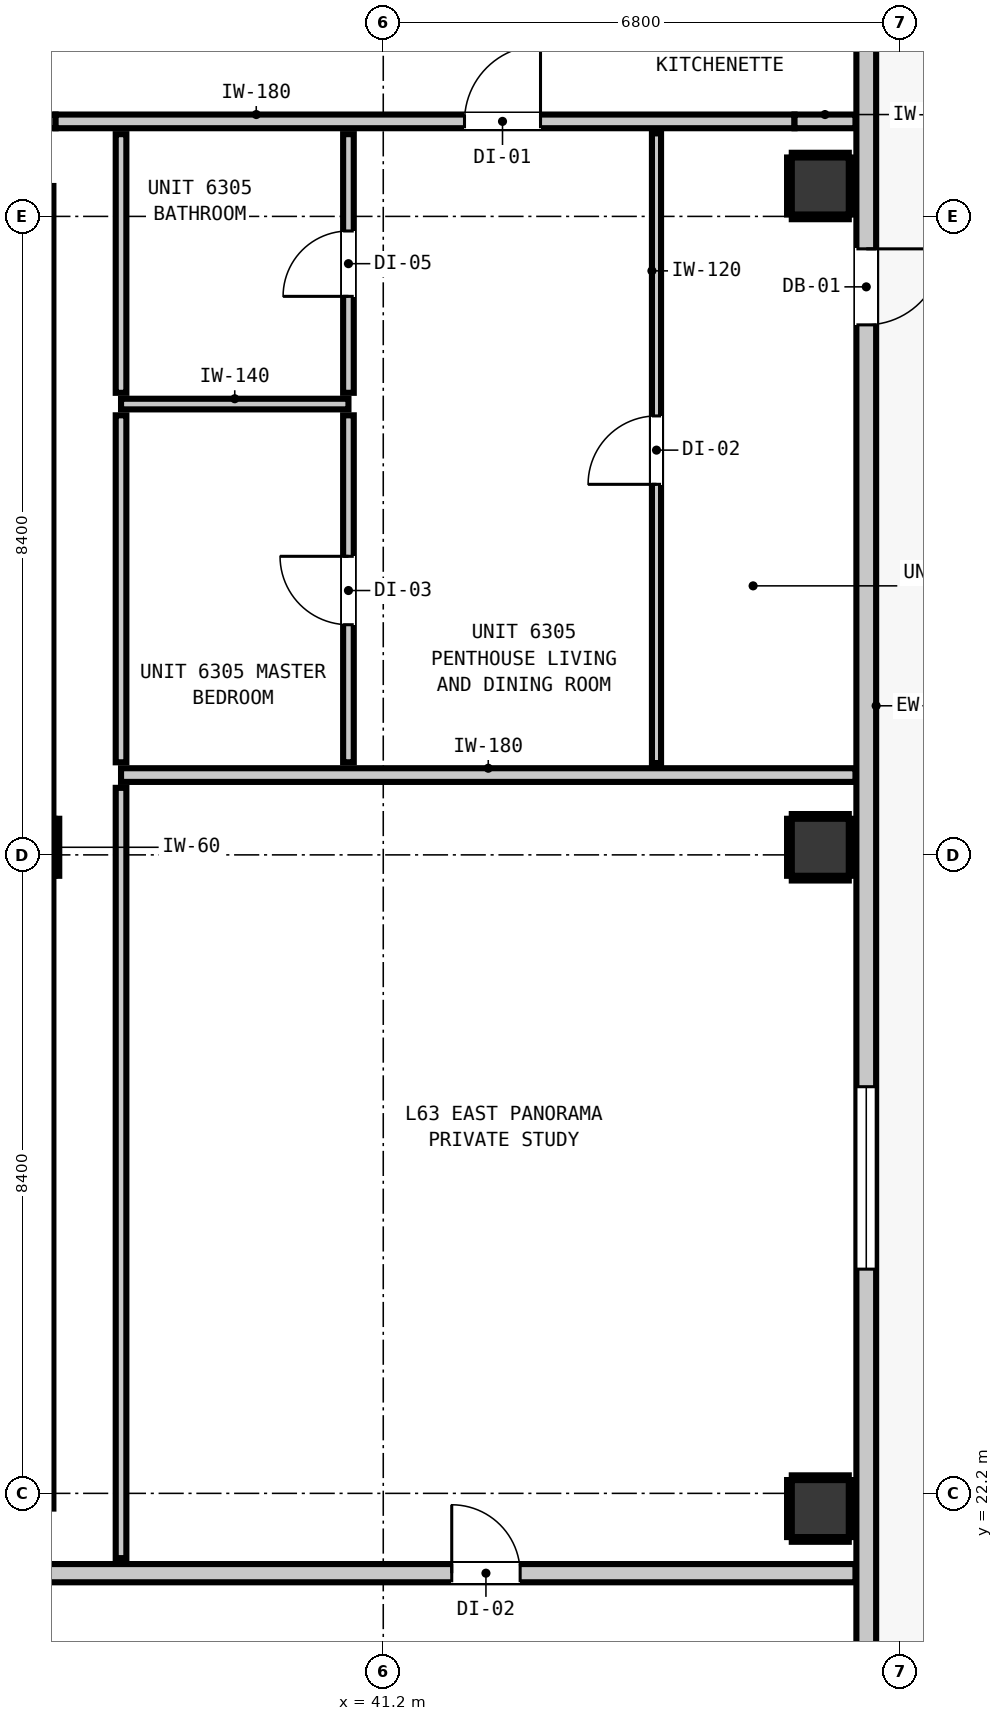
"""IFC4 building model, lengths in metres.
Left out: names, types, materials, properties, quantities, classifications, styles, units other than length and angle.
Written with IfcOpenShell. Run it as: python <this file> out.ifc"""

import sys

from ifc_helpers import new_model, si_unit, direction, frame, frame_2d, origin, origin_2d, place, context, subcontext, project, spatial, rectangle, extrude, element, fill, save


model = new_model("IFC4")
c1 = context("Model", 3, precision=1e-05, world=origin(), true_north=direction((0.0, 1.0)))
c2 = subcontext(c1, "Body", "Model", "MODEL_VIEW")
j1 = project(units=[si_unit("LENGTHUNIT", "METRE"), si_unit("PLANEANGLEUNIT", "RADIAN")], contexts=[c1])
p1 = place(None, origin())
s1 = spatial("IfcSite", under=j1, at=p1, CompositionType="ELEMENT")
p2 = place(p1, origin())
s2 = spatial("IfcBuilding", under=s1, at=p2, CompositionType="ELEMENT")
p3 = place(p2, frame((0.0, 0.0, 216.72)))
s3 = spatial("IfcBuildingStorey", under=s2, at=p3, CompositionType="ELEMENT", Elevation=216.72)
p4 = place(p3, frame((36.5, 30.7, 0.0), z_axis=(0.0, 0.0, 1.0), x_axis=(1.0, 0.0, 0.0)))
e1 = element("IfcColumn", 1, at=p4, inside=s3, PredefinedType="COLUMN", context=c2, shape_type="SweptSolid", body=[
    extrude(rectangle(XDim=0.75, YDim=0.75, at=origin_2d()), origin(), (0.0, 0.0, 1.0), 3.32),
])
p5 = place(p3, frame((36.46, 22.0, 0.0), z_axis=(0.0, 0.0, 1.0), x_axis=(0.0, 1.0, 0.0)))
e2 = element("IfcWall", 2, at=p5, inside=s3, PredefinedType="SHEAR", context=c2, shape_type="SweptSolid", body=[
    extrude(rectangle(XDim=8.32, YDim=0.8, at=frame_2d((4.16, 0.0))), origin(), (0.0, 0.0, 1.0), 3.32),
])
p6 = place(p3, frame((36.46, 31.08, 0.0), z_axis=(0.0, 0.0, 1.0), x_axis=(0.0, 1.0, 0.0)))
e3 = element("IfcWall", 3, at=p6, inside=s3, PredefinedType="SHEAR", context=c2, shape_type="SweptSolid", body=[
    extrude(rectangle(XDim=8.32, YDim=0.8, at=frame_2d((4.16, 0.0))), origin(), (0.0, 0.0, 1.0), 3.32),
])
for number, where, z_axis, x_axis in (
    (4, (46.95, 22.0, 0.0), (0.0, 0.0, 1.0), (1.0, 0.0, 0.0)),
    (5, (46.95, 30.7, 0.0), (0.0, 0.0, 1.0), (1.0, 0.0, 0.0)),
    (6, (46.95, 39.4, 0.0), (0.0, 0.0, 1.0), (1.0, 0.0, 0.0)),
):
    element("IfcColumn", number, at=place(p3, frame(where, z_axis=z_axis, x_axis=x_axis)), inside=s3, PredefinedType="COLUMN", context=c2, shape_type="SweptSolid", body=[
        extrude(rectangle(XDim=0.75, YDim=0.75, at=origin_2d()), origin(), (0.0, 0.0, 1.0), 3.32),
    ])
p7 = place(p3, frame((47.555, 42.655, 0.0), z_axis=(0.0, 0.0, 1.0), x_axis=(0.0, -1.0, 0.0)))
e7 = element("IfcWall", 7, at=p7, inside=s3, PredefinedType="STANDARD", context=c2, shape_type="SweptSolid", body=[
    extrude(rectangle(XDim=30.31, YDim=0.26, at=frame_2d((15.155, 0.0))), origin(), (0.0, 0.0, 1.0), 3.1),
])
p8 = place(p7, frame((4.082, 0.0, 0.0)))
e8 = element("IfcOpeningElement", 8, at=p8, cuts=e7, PredefinedType="OPENING", context=c2, shape_type="SweptSolid", body=[
    extrude(rectangle(XDim=1.0, YDim=2.15, at=frame_2d((0.5, 1.075))), frame((0.0, 0.14, 0.0), z_axis=(0.0, -1.0, 0.0), x_axis=(1.0, 0.0, 0.0)), (0.0, 0.0, 1.0), 0.28),
])
p9 = place(p7, frame((23.951, 0.0, 0.85)))
e9 = element("IfcOpeningElement", 9, at=p9, cuts=e7, PredefinedType="OPENING", context=c2, shape_type="SweptSolid", body=[
    extrude(rectangle(XDim=2.4, YDim=1.95, at=frame_2d((1.2, 0.975))), frame((0.0, 0.14, 0.0), z_axis=(0.0, -1.0, 0.0), x_axis=(1.0, 0.0, 0.0)), (0.0, 0.0, 1.0), 0.28),
])
p10 = place(p7, frame((27.508, 0.0, 0.85)))
e10 = element("IfcOpeningElement", 10, at=p10, cuts=e7, PredefinedType="OPENING", context=c2, shape_type="SweptSolid", body=[
    extrude(rectangle(XDim=2.4, YDim=1.95, at=frame_2d((1.2, 0.975))), frame((0.0, 0.14, 0.0), z_axis=(0.0, -1.0, 0.0), x_axis=(1.0, 0.0, 0.0)), (0.0, 0.0, 1.0), 0.28),
])
p11 = place(p7, frame((15.105, 0.0, 0.85)))
e11 = element("IfcOpeningElement", 11, at=p11, cuts=e7, PredefinedType="OPENING", context=c2, shape_type="SweptSolid", body=[
    extrude(rectangle(XDim=2.4, YDim=1.95, at=frame_2d((1.2, 0.975))), frame((0.0, 0.14, 0.0), z_axis=(0.0, -1.0, 0.0), x_axis=(1.0, 0.0, 0.0)), (0.0, 0.0, 1.0), 0.28),
])
p12 = place(p3, frame((10.787, 21.15, 0.0), z_axis=(0.0, 0.0, 1.0), x_axis=(1.0, 0.0, 0.0)))
e12 = element("IfcWall", 12, at=p12, inside=s3, PredefinedType="PARTITIONING", context=c2, shape_type="SweptSolid", body=[
    extrude(rectangle(XDim=36.626, YDim=0.24, at=frame_2d((18.313, 0.0))), origin(), (0.0, 0.0, 1.0), 3.1),
])
p13 = place(p12, frame((7.423, 0.0, 0.0)))
e13 = element("IfcOpeningElement", 13, at=p13, cuts=e12, PredefinedType="OPENING", context=c2, shape_type="SweptSolid", body=[
    extrude(rectangle(XDim=1.1, YDim=2.15, at=frame_2d((0.55, 1.075))), frame((0.0, 0.13, 0.0), z_axis=(0.0, -1.0, 0.0), x_axis=(1.0, 0.0, 0.0)), (0.0, 0.0, 1.0), 0.26),
])
p14 = place(p12, frame((31.314, 0.0, 0.0)))
e14 = element("IfcOpeningElement", 14, at=p14, cuts=e12, PredefinedType="OPENING", context=c2, shape_type="SweptSolid", body=[
    extrude(rectangle(XDim=0.9, YDim=2.1, at=frame_2d((0.45, 1.05))), frame((0.0, 0.13, 0.0), z_axis=(0.0, -1.0, 0.0), x_axis=(1.0, 0.0, 0.0)), (0.0, 0.0, 1.0), 0.26),
])
p15 = place(p3, frame((37.75, 31.65, 0.0), z_axis=(0.0, 0.0, 1.0), x_axis=(1.0, 0.0, 0.0)))
e15 = element("IfcWall", 15, at=p15, inside=s3, PredefinedType="PARTITIONING", context=c2, shape_type="SweptSolid", body=[
    extrude(rectangle(XDim=9.663, YDim=0.18, at=frame_2d((4.832, 0.0))), origin(), (0.0, 0.0, 1.0), 3.1),
])
p16 = place(p3, frame((10.787, 40.25, 0.0), z_axis=(0.0, 0.0, 1.0), x_axis=(1.0, 0.0, 0.0)))
e16 = element("IfcWall", 16, at=p16, inside=s3, PredefinedType="PARTITIONING", context=c2, shape_type="SweptSolid", body=[
    extrude(rectangle(XDim=26.102, YDim=0.18, at=frame_2d((13.051, 0.0))), origin(), (0.0, 0.0, 1.0), 3.1),
])
p17 = place(p16, frame((6.648, 0.0, 0.0)))
e17 = element("IfcOpeningElement", 17, at=p17, cuts=e16, PredefinedType="OPENING", context=c2, shape_type="SweptSolid", body=[
    extrude(rectangle(XDim=1.4, YDim=2.15, at=frame_2d((0.7, 1.075))), frame((0.0, 0.1, 0.0), z_axis=(0.0, -1.0, 0.0), x_axis=(1.0, 0.0, 0.0)), (0.0, 0.0, 1.0), 0.2),
])
p18 = place(p3, frame((36.889, 40.25, 0.0), z_axis=(0.0, 0.0, 1.0), x_axis=(1.0, 0.0, 0.0)))
e18 = element("IfcWall", 18, at=p18, inside=s3, PredefinedType="PARTITIONING", context=c2, shape_type="SweptSolid", body=[
    extrude(rectangle(XDim=9.722, YDim=0.18, at=frame_2d((4.861, 0.0))), origin(), (0.0, 0.0, 1.0), 2.477),
])
p19 = place(p18, frame((5.38, 0.0, 0.0)))
e19 = element("IfcOpeningElement", 19, at=p19, cuts=e18, PredefinedType="OPENING", context=c2, shape_type="SweptSolid", body=[
    extrude(rectangle(XDim=1.0, YDim=2.15, at=frame_2d((0.5, 1.075))), frame((0.0, 0.1, 0.0), z_axis=(0.0, -1.0, 0.0), x_axis=(1.0, 0.0, 0.0)), (0.0, 0.0, 1.0), 0.2),
])
p20 = place(p3, frame((46.611, 40.25, 0.0), z_axis=(0.0, 0.0, 1.0), x_axis=(1.0, 0.0, 0.0)))
e20 = element("IfcWall", 20, at=p20, inside=s3, PredefinedType="PARTITIONING", context=c2, shape_type="SweptSolid", body=[
    extrude(rectangle(XDim=0.802, YDim=0.18, at=frame_2d((0.401, 0.0))), origin(), (0.0, 0.0, 1.0), 3.1),
])
p21 = place(p3, frame((37.75, 36.531, 0.0), z_axis=(0.0, 0.0, 1.0), x_axis=(1.0, 0.0, 0.0)))
e21 = element("IfcWall", 21, at=p21, inside=s3, PredefinedType="PARTITIONING", context=c2, shape_type="SweptSolid", body=[
    extrude(rectangle(XDim=2.992, YDim=0.14, at=frame_2d((1.496, 0.0))), origin(), (0.0, 0.0, 1.0), 3.1),
])
p22 = place(p3, frame((37.75, 21.348, 0.0), z_axis=(0.0, 0.0, 1.0), x_axis=(0.0, 1.0, 0.0)))
e22 = element("IfcWall", 22, at=p22, inside=s3, PredefinedType="PARTITIONING", context=c2, shape_type="SweptSolid", body=[
    extrude(rectangle(XDim=10.134, YDim=0.14, at=frame_2d((5.067, 0.0))), origin(), (0.0, 0.0, 1.0), 3.1),
])
p23 = place(p3, frame((37.75, 31.818, 0.0), z_axis=(0.0, 0.0, 1.0), x_axis=(0.0, 1.0, 0.0)))
e23 = element("IfcWall", 23, at=p23, inside=s3, PredefinedType="PARTITIONING", context=c2, shape_type="SweptSolid", body=[
    extrude(rectangle(XDim=4.565, YDim=0.14, at=frame_2d((2.282, 0.0))), origin(), (0.0, 0.0, 1.0), 3.1),
])
p24 = place(p3, frame((37.75, 36.679, 0.0), z_axis=(0.0, 0.0, 1.0), x_axis=(0.0, 1.0, 0.0)))
e24 = element("IfcWall", 24, at=p24, inside=s3, PredefinedType="PARTITIONING", context=c2, shape_type="SweptSolid", body=[
    extrude(rectangle(XDim=3.403, YDim=0.14, at=frame_2d((1.702, 0.0))), origin(), (0.0, 0.0, 1.0), 3.1),
])
p25 = place(p3, frame((40.742, 31.818, 0.0), z_axis=(0.0, 0.0, 1.0), x_axis=(0.0, 1.0, 0.0)))
e25 = element("IfcWall", 25, at=p25, inside=s3, PredefinedType="PARTITIONING", context=c2, shape_type="SweptSolid", body=[
    extrude(rectangle(XDim=4.565, YDim=0.14, at=frame_2d((2.282, 0.0))), origin(), (0.0, 0.0, 1.0), 3.1),
])
p26 = place(p25, frame((1.81, 0.0, 0.0)))
e26 = element("IfcOpeningElement", 26, at=p26, cuts=e25, PredefinedType="OPENING", context=c2, shape_type="SweptSolid", body=[
    extrude(rectangle(XDim=0.9, YDim=2.1, at=frame_2d((0.45, 1.05))), frame((0.0, 0.08, 0.0), z_axis=(0.0, -1.0, 0.0), x_axis=(1.0, 0.0, 0.0)), (0.0, 0.0, 1.0), 0.16),
])
p27 = place(p3, frame((40.742, 36.679, 0.0), z_axis=(0.0, 0.0, 1.0), x_axis=(0.0, 1.0, 0.0)))
e27 = element("IfcWall", 27, at=p27, inside=s3, PredefinedType="PARTITIONING", context=c2, shape_type="SweptSolid", body=[
    extrude(rectangle(XDim=3.403, YDim=0.14, at=frame_2d((1.702, 0.0))), origin(), (0.0, 0.0, 1.0), 3.1),
])
p28 = place(p27, frame((1.269, 0.0, 0.0)))
e28 = element("IfcOpeningElement", 28, at=p28, cuts=e27, PredefinedType="OPENING", context=c2, shape_type="SweptSolid", body=[
    extrude(rectangle(XDim=0.86, YDim=2.02, at=frame_2d((0.43, 1.01))), frame((0.0, 0.08, 0.0), z_axis=(0.0, -1.0, 0.0), x_axis=(1.0, 0.0, 0.0)), (0.0, 0.0, 1.0), 0.16),
])
p29 = place(p3, frame((44.795, 31.808, 0.0), z_axis=(0.0, 0.0, 1.0), x_axis=(0.0, 1.0, 0.0)))
e29 = element("IfcWall", 29, at=p29, inside=s3, PredefinedType="PARTITIONING", context=c2, shape_type="SweptSolid", body=[
    extrude(rectangle(XDim=8.284, YDim=0.12, at=frame_2d((4.142, 0.0))), origin(), (0.0, 0.0, 1.0), 3.1),
])
p30 = place(p29, frame((3.667, 0.0, 0.0)))
e30 = element("IfcOpeningElement", 30, at=p30, cuts=e29, PredefinedType="OPENING", context=c2, shape_type="SweptSolid", body=[
    extrude(rectangle(XDim=0.9, YDim=2.1, at=frame_2d((0.45, 1.05))), frame((0.0, 0.07, 0.0), z_axis=(0.0, -1.0, 0.0), x_axis=(1.0, 0.0, 0.0)), (0.0, 0.0, 1.0), 0.14),
])
for number, where, z_axis, x_axis in (
    (31, (36.907, 30.325, 0.0), (0.0, 0.0, 1.0), (0.0, 1.0, 0.0)),
    (32, (46.575, 21.593, 0.0), (0.0, 0.0, 1.0), (1.0, 0.0, 0.0)),
    (33, (46.575, 22.407, 0.0), (0.0, 0.0, 1.0), (1.0, 0.0, 0.0)),
    (34, (46.543, 21.625, 0.0), (0.0, 0.0, 1.0), (0.0, 1.0, 0.0)),
    (35, (47.357, 21.625, 0.0), (0.0, 0.0, 1.0), (0.0, 1.0, 0.0)),
    (36, (46.575, 30.293, 0.0), (0.0, 0.0, 1.0), (1.0, 0.0, 0.0)),
    (37, (46.575, 31.107, 0.0), (0.0, 0.0, 1.0), (1.0, 0.0, 0.0)),
    (38, (46.543, 30.325, 0.0), (0.0, 0.0, 1.0), (0.0, 1.0, 0.0)),
    (39, (47.357, 30.325, 0.0), (0.0, 0.0, 1.0), (0.0, 1.0, 0.0)),
    (40, (46.575, 38.993, 0.0), (0.0, 0.0, 1.0), (1.0, 0.0, 0.0)),
    (41, (46.575, 39.807, 0.0), (0.0, 0.0, 1.0), (1.0, 0.0, 0.0)),
    (42, (46.543, 39.025, 0.0), (0.0, 0.0, 1.0), (0.0, 1.0, 0.0)),
    (43, (47.357, 39.025, 0.0), (0.0, 0.0, 1.0), (0.0, 1.0, 0.0)),
):
    element("IfcWall", number, at=place(p3, frame(where, z_axis=z_axis, x_axis=x_axis)), inside=s3, PredefinedType="PARTITIONING", context=c2, shape_type="SweptSolid", body=[
        extrude(rectangle(XDim=0.75, YDim=0.06, at=frame_2d((0.375, 0.0))), origin(), (0.0, 0.0, 1.0), 1.45),
    ])
p31 = place(p8, origin())
e44 = element("IfcDoor", 44, at=p31, inside=s3, OperationType="SINGLE_SWING_LEFT", PredefinedType="DOOR", context=c2, shape_type="SweptSolid", body=[
    extrude(rectangle(XDim=1.0, YDim=2.15, at=frame_2d((0.5, 1.075))), frame((0.0, 0.025, 0.0), z_axis=(0.0, -1.0, 0.0), x_axis=(1.0, 0.0, 0.0)), (0.0, 0.0, 1.0), 0.05),
])
fill(e8, e44)
p32 = place(p11, origin())
e45 = element("IfcWindow", 45, at=p32, inside=s3, PartitioningType="SINGLE_PANEL", PredefinedType="WINDOW", context=c2, shape_type="SweptSolid", body=[
    extrude(rectangle(XDim=2.4, YDim=1.95, at=frame_2d((1.2, 0.975))), frame((0.0, 0.03, 0.0), z_axis=(0.0, -1.0, 0.0), x_axis=(1.0, 0.0, 0.0)), (0.0, 0.0, 1.0), 0.06),
])
fill(e11, e45)
p33 = place(p14, origin())
e46 = element("IfcDoor", 46, at=p33, inside=s3, OperationType="SINGLE_SWING_LEFT", PredefinedType="DOOR", context=c2, shape_type="SweptSolid", body=[
    extrude(rectangle(XDim=0.9, YDim=2.1, at=frame_2d((0.45, 1.05))), frame((0.0, 0.025, 0.0), z_axis=(0.0, -1.0, 0.0), x_axis=(1.0, 0.0, 0.0)), (0.0, 0.0, 1.0), 0.05),
])
fill(e14, e46)
p34 = place(p19, origin())
e47 = element("IfcDoor", 47, at=p34, inside=s3, OperationType="SINGLE_SWING_RIGHT", PredefinedType="DOOR", context=c2, shape_type="SweptSolid", body=[
    extrude(rectangle(XDim=1.0, YDim=2.15, at=frame_2d((0.5, 1.075))), frame((0.0, 0.025, 0.0), z_axis=(0.0, -1.0, 0.0), x_axis=(1.0, 0.0, 0.0)), (0.0, 0.0, 1.0), 0.05),
])
fill(e19, e47)
p35 = place(p28, origin())
e48 = element("IfcDoor", 48, at=p35, inside=s3, OperationType="SINGLE_SWING_LEFT", PredefinedType="DOOR", context=c2, shape_type="SweptSolid", body=[
    extrude(rectangle(XDim=0.86, YDim=2.02, at=frame_2d((0.43, 1.01))), frame((0.0, 0.025, 0.0), z_axis=(0.0, -1.0, 0.0), x_axis=(1.0, 0.0, 0.0)), (0.0, 0.0, 1.0), 0.05),
])
fill(e28, e48)
p36 = place(p26, origin())
e49 = element("IfcDoor", 49, at=p36, inside=s3, OperationType="SINGLE_SWING_RIGHT", PredefinedType="DOOR", context=c2, shape_type="SweptSolid", body=[
    extrude(rectangle(XDim=0.9, YDim=2.1, at=frame_2d((0.45, 1.05))), frame((0.0, 0.025, 0.0), z_axis=(0.0, -1.0, 0.0), x_axis=(1.0, 0.0, 0.0)), (0.0, 0.0, 1.0), 0.05),
])
fill(e26, e49)
p37 = place(p30, origin())
e50 = element("IfcDoor", 50, at=p37, inside=s3, OperationType="SINGLE_SWING_LEFT", PredefinedType="DOOR", context=c2, shape_type="SweptSolid", body=[
    extrude(rectangle(XDim=0.9, YDim=2.1, at=frame_2d((0.45, 1.05))), frame((0.0, 0.025, 0.0), z_axis=(0.0, -1.0, 0.0), x_axis=(1.0, 0.0, 0.0)), (0.0, 0.0, 1.0), 0.05),
])
fill(e30, e50)
save(model, sys.argv[1])
